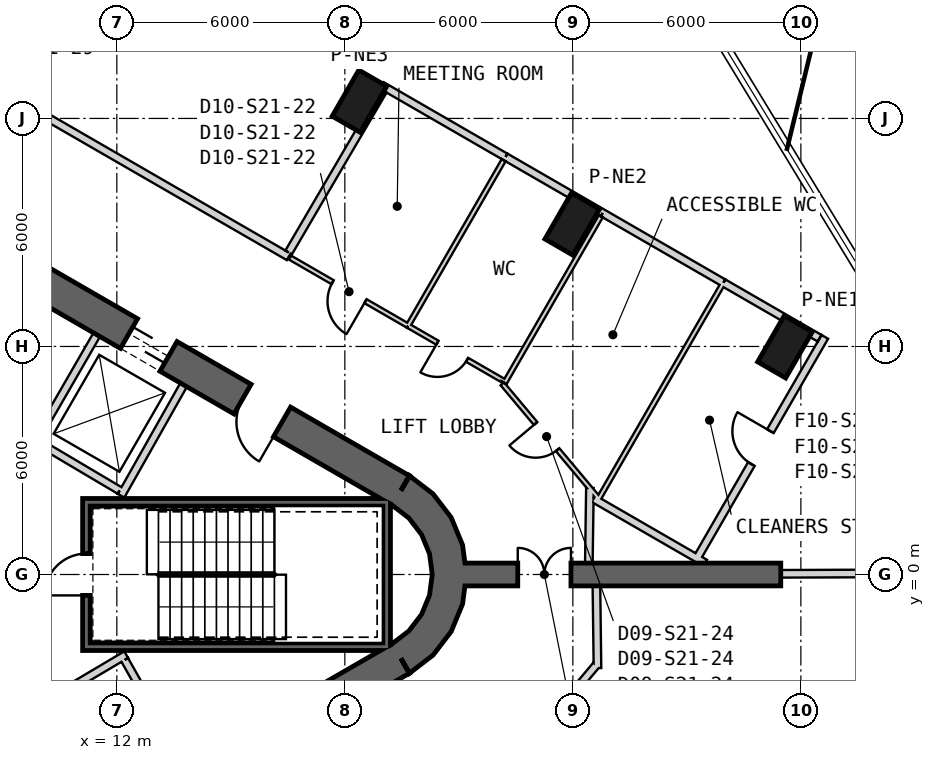
"""IFC4 building model, lengths in metres.
Left out: names, types, materials, properties, quantities, classifications, styles, units other than length and angle.
Written with IfcOpenShell. Run it as: python <this file> out.ifc"""

import sys

from ifc_helpers import new_model, si_unit, direction, frame, frame_2d, origin, origin_2d, place, context, subcontext, project, spatial, polyline, rectangle, outline, extrude, element, fill, save


model = new_model("IFC4")
c1 = context("Model", 3, precision=1e-05, world=origin(), true_north=direction((0.0, 1.0)))
c2 = subcontext(c1, "Body", "Model", "MODEL_VIEW")
j1 = project(units=[si_unit("LENGTHUNIT", "METRE"), si_unit("PLANEANGLEUNIT", "RADIAN")], contexts=[c1])
p1 = place(None, origin())
s1 = spatial("IfcSite", under=j1, at=p1, CompositionType="ELEMENT")
p2 = place(p1, origin())
s2 = spatial("IfcBuilding", under=s1, at=p2, CompositionType="ELEMENT")
p3 = place(p2, frame((0.0, 0.0, 333.8)))
s3 = spatial("IfcBuildingStorey", under=s2, at=p3, CompositionType="ELEMENT", Elevation=333.8)
for number, where, z_axis, x_axis in (
    (1, (29.582, 5.99, 0.0), (0.0, 0.0, 1.0), (0.5, 0.866, 0.0)),
    (2, (23.984, 9.221, 0.0), (0.0, 0.0, 1.0), (0.5, 0.866, 0.0)),
    (3, (18.386, 12.453, 0.0), (0.0, 0.0, 1.0), (0.5, 0.866, 0.0)),
):
    element("IfcColumn", number, at=place(p3, frame(where, z_axis=z_axis, x_axis=x_axis)), inside=s3, PredefinedType="COLUMN", context=c2, shape_type="SweptSolid", body=[
        extrude(rectangle(XDim=1.4, YDim=0.85, at=origin_2d()), origin(), (0.0, 0.0, 1.0), 3.9),
    ])
p4 = place(p3, frame((19.475, 2.208, 0.0), z_axis=(0.0, 0.0, 1.0), x_axis=(-0.866028369851, 0.499994862586, 0.0)))
e4 = element("IfcWall", 4, at=p4, inside=s3, PredefinedType="SHEAR", context=c2, shape_type="SweptSolid", body=[
    extrude(rectangle(XDim=31.523, YDim=0.9, at=frame_2d((15.762, 0.0))), origin(), (0.0, 0.0, 1.0), 3.9),
])
p5 = place(p4, frame((7.062, 0.0, 0.0)))
e5 = element("IfcOpeningElement", 5, at=p5, cuts=e4, PredefinedType="OPENING", context=c2, shape_type="SweptSolid", body=[
    extrude(rectangle(XDim=1.2, YDim=2.4, at=frame_2d((0.6, 1.2))), frame((0.0, 0.46, 0.0), z_axis=(0.0, -1.0, 0.0), x_axis=(1.0, 0.0, 0.0)), (0.0, 0.0, 1.0), 0.92),
])
p6 = place(p4, frame((3.612, 0.0, 0.0)))
e6 = element("IfcOpeningElement", 6, at=p6, cuts=e4, PredefinedType="OPENING", context=c2, shape_type="SweptSolid", body=[
    extrude(rectangle(XDim=1.2, YDim=2.4, at=frame_2d((0.6, 1.2))), frame((0.0, 0.46, 0.0), z_axis=(0.0, -1.0, 0.0), x_axis=(1.0, 0.0, 0.0)), (0.0, 0.0, 1.0), 0.92),
])
p7 = place(p4, frame((26.712, 0.0, 0.0)))
e7 = element("IfcOpeningElement", 7, at=p7, cuts=e4, PredefinedType="OPENING", context=c2, shape_type="SweptSolid", body=[
    extrude(rectangle(XDim=1.2, YDim=2.4, at=frame_2d((0.6, 1.2))), frame((0.0, 0.46, 0.0), z_axis=(0.0, -1.0, 0.0), x_axis=(1.0, 0.0, 0.0)), (0.0, 0.0, 1.0), 0.92),
])
p8 = place(p3, frame((-7.825, -17.97, 0.0), z_axis=(0.0, 0.0, 1.0), x_axis=(0.866028369851, 0.499994862586, 0.0)))
e8 = element("IfcWall", 8, at=p8, inside=s3, PredefinedType="SHEAR", context=c2, shape_type="SweptSolid", body=[
    extrude(rectangle(XDim=31.523, YDim=0.9, at=frame_2d((15.762, 0.0))), origin(), (0.0, 0.0, 1.0), 3.9),
])
p9 = place(p8, frame((17.862, 0.0, 0.0)))
e9 = element("IfcOpeningElement", 9, at=p9, cuts=e8, PredefinedType="OPENING", context=c2, shape_type="SweptSolid", body=[
    extrude(rectangle(XDim=1.2, YDim=2.4, at=frame_2d((0.6, 1.2))), frame((0.0, 0.46, 0.0), z_axis=(0.0, -1.0, 0.0), x_axis=(1.0, 0.0, 0.0)), (0.0, 0.0, 1.0), 0.92),
])
p10 = place(p8, frame((20.562, 0.0, 0.0)))
e10 = element("IfcOpeningElement", 10, at=p10, cuts=e8, PredefinedType="OPENING", context=c2, shape_type="SweptSolid", body=[
    extrude(rectangle(XDim=1.2, YDim=2.4, at=frame_2d((0.6, 1.2))), frame((0.0, 0.46, 0.0), z_axis=(0.0, -1.0, 0.0), x_axis=(1.0, 0.0, 0.0)), (0.0, 0.0, 1.0), 0.92),
])
p11 = place(p8, frame((26.712, 0.0, 0.0)))
e11 = element("IfcOpeningElement", 11, at=p11, cuts=e8, PredefinedType="OPENING", context=c2, shape_type="SweptSolid", body=[
    extrude(rectangle(XDim=1.2, YDim=2.4, at=frame_2d((0.6, 1.2))), frame((0.0, 0.46, 0.0), z_axis=(0.0, -1.0, 0.0), x_axis=(1.0, 0.0, 0.0)), (0.0, 0.0, 1.0), 0.92),
])
p12 = place(p8, frame((3.612, 0.0, 0.0)))
e12 = element("IfcOpeningElement", 12, at=p12, cuts=e8, PredefinedType="OPENING", context=c2, shape_type="SweptSolid", body=[
    extrude(rectangle(XDim=1.2, YDim=2.4, at=frame_2d((0.6, 1.2))), frame((0.0, 0.46, 0.0), z_axis=(0.0, -1.0, 0.0), x_axis=(1.0, 0.0, 0.0)), (0.0, 0.0, 1.0), 0.92),
])
p13 = place(p3, origin())
e13 = element("IfcWall", 13, at=p13, inside=s3, PredefinedType="SHEAR", context=c2, shape_type="SweptSolid", body=[
    extrude(outline(polyline([(19.7, -2.598), (20.321, -2.121), (20.798, -1.5), (21.098, -0.777), (21.2, 0.0), (21.098, 0.777), (20.798, 1.5), (20.321, 2.121), (19.7, 2.598), (19.25, 1.819), (19.685, 1.485), (20.019, 1.05), (20.229, 0.543), (20.3, 0.0), (20.229, -0.543), (20.019, -1.05), (19.685, -1.485), (19.25, -1.819), (19.7, -2.598)])), origin(), (0.0, 0.0, 1.0), 3.9),
])
p14 = place(p3, frame((21.15, 0.0, 0.0), z_axis=(0.0, 0.0, 1.0), x_axis=(1.0, 0.0, 0.0)))
e14 = element("IfcWall", 14, at=p14, inside=s3, PredefinedType="SHEAR", context=c2, shape_type="SweptSolid", body=[
    extrude(rectangle(XDim=8.321, YDim=0.6, at=frame_2d((4.16, 0.0))), origin(), (0.0, 0.0, 1.0), 3.9),
])
p15 = place(p14, frame((1.4, 0.0, 0.0)))
e15 = element("IfcOpeningElement", 15, at=p15, cuts=e14, PredefinedType="OPENING", context=c2, shape_type="SweptSolid", body=[
    extrude(rectangle(XDim=1.4, YDim=2.4, at=frame_2d((0.7, 1.2))), frame((0.0, 0.31, 0.0), z_axis=(0.0, -1.0, 0.0), x_axis=(1.0, 0.0, 0.0)), (0.0, 0.0, 1.0), 0.62),
])
p16 = place(p3, frame((9.847, 3.495, 0.0), z_axis=(0.0, 0.0, 1.0), x_axis=(0.499984717929, 0.866034226713, 0.0)))
e16 = element("IfcWall", 16, at=p16, inside=s3, PredefinedType="PLUMBINGWALL", context=c2, shape_type="SweptSolid", body=[
    extrude(rectangle(XDim=3.25, YDim=0.2, at=frame_2d((1.625, 0.0))), origin(), (0.0, 0.0, 1.0), 3.6),
])
p17 = place(p3, frame((12.11, 2.073, 0.0), z_axis=(0.0, 0.0, 1.0), x_axis=(0.49196600604, 0.870614408852, 0.0)))
e17 = element("IfcWall", 17, at=p17, inside=s3, PredefinedType="PLUMBINGWALL", context=c2, shape_type="SweptSolid", body=[
    extrude(rectangle(XDim=3.35, YDim=0.2, at=frame_2d((1.675, 0.0))), origin(), (0.0, 0.0, 1.0), 3.6),
])
p18 = place(p3, frame((12.073, 2.211, 0.0), z_axis=(0.0, 0.0, 1.0), x_axis=(-0.860414880418, 0.509594185166, 0.0)))
e18 = element("IfcWall", 18, at=p18, inside=s3, PredefinedType="PLUMBINGWALL", context=c2, shape_type="SweptSolid", body=[
    extrude(rectangle(XDim=2.7, YDim=0.2, at=frame_2d((1.35, 0.0))), origin(), (0.0, 0.0, 1.0), 3.6),
])
p19 = place(p3, frame((19.2, 1.9, -0.3), z_axis=(0.0, 0.0, 1.0), x_axis=(-1.0, 0.0, 0.0)))
e19 = element("IfcWall", 19, at=p19, inside=s3, PredefinedType="SHEAR", context=c2, shape_type="SweptSolid", body=[
    extrude(rectangle(XDim=8.1, YDim=0.2, at=frame_2d((4.05, 0.0))), origin(), (0.0, 0.0, 1.0), 3.9),
])
p20 = place(p3, frame((19.1, -2.0, -0.3), z_axis=(0.0, 0.0, 1.0), x_axis=(0.0, 1.0, 0.0)))
e20 = element("IfcWall", 20, at=p20, inside=s3, PredefinedType="SHEAR", context=c2, shape_type="SweptSolid", body=[
    extrude(rectangle(XDim=3.8, YDim=0.2, at=frame_2d((1.9, 0.0))), origin(), (0.0, 0.0, 1.0), 3.9),
])
p21 = place(p3, frame((11.1, -1.9, -0.3), z_axis=(0.0, 0.0, 1.0), x_axis=(1.0, 0.0, 0.0)))
e21 = element("IfcWall", 21, at=p21, inside=s3, PredefinedType="SHEAR", context=c2, shape_type="SweptSolid", body=[
    extrude(rectangle(XDim=7.9, YDim=0.2, at=frame_2d((3.95, 0.0))), origin(), (0.0, 0.0, 1.0), 3.9),
])
p22 = place(p3, frame((11.2, -1.8, -0.3), z_axis=(0.0, 0.0, 1.0), x_axis=(0.0, 1.0, 0.0)))
e22 = element("IfcWall", 22, at=p22, inside=s3, PredefinedType="SHEAR", context=c2, shape_type="SweptSolid", body=[
    extrude(rectangle(XDim=3.6, YDim=0.2, at=frame_2d((1.8, 0.0))), origin(), (0.0, 0.0, 1.0), 3.9),
])
p23 = place(p22, frame((1.25, 0.0, 0.3)))
e23 = element("IfcOpeningElement", 23, at=p23, cuts=e22, PredefinedType="OPENING", context=c2, shape_type="SweptSolid", body=[
    extrude(rectangle(XDim=1.1, YDim=2.1, at=frame_2d((0.55, 1.05))), frame((0.0, 0.11, 0.0), z_axis=(0.0, -1.0, 0.0), x_axis=(1.0, 0.0, 0.0)), (0.0, 0.0, 1.0), 0.22),
])
p24 = place(p3, frame((12.245, -2.109, 0.0), z_axis=(0.0, 0.0, 1.0), x_axis=(-0.860414880418, -0.509594185166, 0.0)))
e24 = element("IfcWall", 24, at=p24, inside=s3, PredefinedType="PARTITIONING", context=c2, shape_type="SweptSolid", body=[
    extrude(rectangle(XDim=2.7, YDim=0.2, at=frame_2d((1.35, 0.0))), origin(), (0.0, 0.0, 1.0), 3.6),
])
p25 = place(p3, frame((13.758, -4.99, 0.0), z_axis=(0.0, 0.0, 1.0), x_axis=(-0.491993409184, 0.87059892334, 0.0)))
e25 = element("IfcWall", 25, at=p25, inside=s3, PredefinedType="PARTITIONING", context=c2, shape_type="SweptSolid", body=[
    extrude(rectangle(XDim=3.15, YDim=0.2, at=frame_2d((1.575, 0.0))), origin(), (0.0, 0.0, 1.0), 3.6),
])
p26 = place(p25, frame((1.175, 0.0, 0.0)))
e26 = element("IfcOpeningElement", 26, at=p26, cuts=e25, PredefinedType="OPENING", context=c2, shape_type="SweptSolid", body=[
    extrude(rectangle(XDim=0.8, YDim=2.1, at=frame_2d((0.4, 1.05))), frame((0.0, 0.11, 0.0), z_axis=(0.0, -1.0, 0.0), x_axis=(1.0, 0.0, 0.0)), (0.0, 0.0, 1.0), 0.22),
])
p27 = place(p3, frame((16.523, 8.358, 0.0), z_axis=(0.0, 0.0, 1.0), x_axis=(-0.866025545866, 0.499999753908, 0.0)))
e27 = element("IfcWall", 27, at=p27, inside=s3, PredefinedType="PARTITIONING", context=c2, shape_type="SweptSolid", body=[
    extrude(rectangle(XDim=26.471, YDim=0.2, at=frame_2d((13.235, 0.0))), origin(), (0.0, 0.0, 1.0), 2.97),
])
p28 = place(p27, frame((21.568, 0.0, 0.0)))
e28 = element("IfcOpeningElement", 28, at=p28, cuts=e27, PredefinedType="OPENING", context=c2, shape_type="SweptSolid", body=[
    extrude(rectangle(XDim=1.0, YDim=2.1, at=frame_2d((0.5, 1.05))), frame((0.0, 0.11, 0.0), z_axis=(0.0, -1.0, 0.0), x_axis=(1.0, 0.0, 0.0)), (0.0, 0.0, 1.0), 0.22),
])
p29 = place(p27, frame((8.333, 0.0, 0.0)))
e29 = element("IfcOpeningElement", 29, at=p29, cuts=e27, PredefinedType="OPENING", context=c2, shape_type="SweptSolid", body=[
    extrude(rectangle(XDim=1.0, YDim=2.1, at=frame_2d((0.5, 1.05))), frame((0.0, 0.11, 0.0), z_axis=(0.0, -1.0, 0.0), x_axis=(1.0, 0.0, 0.0)), (0.0, 0.0, 1.0), 0.22),
])
p30 = place(p3, frame((24.421, 0.3, 0.0), z_axis=(0.0, 0.0, 1.0), x_axis=(0.014331902383, 0.999897293013, 0.0)))
e30 = element("IfcWall", 30, at=p30, inside=s3, PredefinedType="PARTITIONING", context=c2, shape_type="SweptSolid", body=[
    extrude(rectangle(XDim=1.976, YDim=0.2, at=frame_2d((0.988, 0.0))), origin(), (0.0, 0.0, 1.0), 3.6),
])
p31 = place(p3, frame((22.168, 5.099, 0.0), z_axis=(0.0, 0.0, 1.0), x_axis=(-0.866005628554, 0.500034250139, 0.0)))
e31 = element("IfcWall", 31, at=p31, inside=s3, PredefinedType="PARTITIONING", context=c2, shape_type="SweptSolid", body=[
    extrude(rectangle(XDim=2.892, YDim=0.12, at=frame_2d((1.446, 0.0))), origin(), (0.0, 0.0, 1.0), 3.6),
])
p32 = place(p31, frame((1.1, 0.0, 0.0)))
e32 = element("IfcOpeningElement", 32, at=p32, cuts=e31, PredefinedType="OPENING", context=c2, shape_type="SweptSolid", body=[
    extrude(rectangle(XDim=0.9, YDim=2.1, at=frame_2d((0.45, 1.05))), frame((0.0, 0.07, 0.0), z_axis=(0.0, -1.0, 0.0), x_axis=(1.0, 0.0, 0.0)), (0.0, 0.0, 1.0), 0.14),
])
p33 = place(p3, frame((19.664, 6.545, 0.0), z_axis=(0.0, 0.0, 1.0), x_axis=(-0.866048453834, 0.499960074017, 0.0)))
e33 = element("IfcWall", 33, at=p33, inside=s3, PredefinedType="PARTITIONING", context=c2, shape_type="SweptSolid", body=[
    extrude(rectangle(XDim=3.587, YDim=0.12, at=frame_2d((1.793, 0.0))), origin(), (0.0, 0.0, 1.0), 2.97),
])
p34 = place(p33, frame((1.294, 0.0, 0.0)))
e34 = element("IfcOpeningElement", 34, at=p34, cuts=e33, PredefinedType="OPENING", context=c2, shape_type="SweptSolid", body=[
    extrude(rectangle(XDim=1.0, YDim=2.1, at=frame_2d((0.5, 1.05))), frame((0.0, 0.07, 0.0), z_axis=(0.0, -1.0, 0.0), x_axis=(1.0, 0.0, 0.0)), (0.0, 0.0, 1.0), 0.14),
])
p35 = place(p3, frame((24.64, 2.043, 0.0), z_axis=(0.0, 0.0, 1.0), x_axis=(-0.642784930138, 0.766046691519, 0.0)))
e35 = element("IfcWall", 35, at=p35, inside=s3, PredefinedType="PARTITIONING", context=c2, shape_type="SweptSolid", body=[
    extrude(rectangle(XDim=3.882, YDim=0.12, at=frame_2d((1.941, 0.0))), origin(), (0.0, 0.0, 1.0), 2.88),
])
p36 = place(p35, frame((1.621, 0.0, 0.0)))
e36 = element("IfcOpeningElement", 36, at=p36, cuts=e35, PredefinedType="OPENING", context=c2, shape_type="SweptSolid", body=[
    extrude(rectangle(XDim=0.9, YDim=2.1, at=frame_2d((0.45, 1.05))), frame((0.0, 0.07, 0.0), z_axis=(0.0, -1.0, 0.0), x_axis=(1.0, 0.0, 0.0)), (0.0, 0.0, 1.0), 0.14),
])
p37 = place(p3, frame((24.648, -2.462, 0.0), z_axis=(0.0, 0.0, 1.0), x_axis=(-0.012757232068, 0.999918623204, 0.0)))
e37 = element("IfcWall", 37, at=p37, inside=s3, PredefinedType="PARTITIONING", context=c2, shape_type="SweptSolid", body=[
    extrude(rectangle(XDim=2.163, YDim=0.2, at=frame_2d((1.081, 0.0))), origin(), (0.0, 0.0, 1.0), 3.6),
])
p38 = place(p3, frame((22.054, -5.435, 0.0), z_axis=(0.0, 0.0, 1.0), x_axis=(0.642790979996, 0.766041615081, 0.0)))
e38 = element("IfcWall", 38, at=p38, inside=s3, PredefinedType="PARTITIONING", context=c2, shape_type="SweptSolid", body=[
    extrude(rectangle(XDim=3.983, YDim=0.2, at=frame_2d((1.992, 0.0))), origin(), (0.0, 0.0, 1.0), 2.88),
])
p39 = place(p3, frame((29.471, 0.018, 0.0), z_axis=(0.0, 0.0, 1.0), x_axis=(0.999993083977, 0.003719139364, 0.0)))
e39 = element("IfcWall", 39, at=p39, inside=s3, PredefinedType="PARTITIONING", context=c2, shape_type="SweptSolid", body=[
    extrude(rectangle(XDim=3.217, YDim=0.2, at=frame_2d((1.608, 0.0))), origin(), (0.0, 0.0, 1.0), 3.17),
])
p40 = place(p3, frame((18.975, 12.866, 0.0), z_axis=(0.0, 0.0, 1.0), x_axis=(0.866007030292, -0.500031822473, 0.0)))
e40 = element("IfcWall", 40, at=p40, inside=s3, PredefinedType="PARTITIONING", context=c2, shape_type="SweptSolid", body=[
    extrude(rectangle(XDim=3.757, YDim=0.2, at=frame_2d((1.878, 0.0))), origin(), (0.0, 0.0, 1.0), 3.6),
])
p41 = place(p3, frame((22.229, 10.988, 0.0), z_axis=(0.0, 0.0, 1.0), x_axis=(0.86604097052, -0.499973036653, 0.0)))
e41 = element("IfcWall", 41, at=p41, inside=s3, PredefinedType="PARTITIONING", context=c2, shape_type="SweptSolid", body=[
    extrude(rectangle(XDim=2.952, YDim=0.2, at=frame_2d((1.476, 0.0))), origin(), (0.0, 0.0, 1.0), 3.6),
])
p42 = place(p3, frame((24.785, 9.512, 0.0), z_axis=(0.0, 0.0, 1.0), x_axis=(0.866027105532, -0.499997052475, 0.0)))
e42 = element("IfcWall", 42, at=p42, inside=s3, PredefinedType="PARTITIONING", context=c2, shape_type="SweptSolid", body=[
    extrude(rectangle(XDim=3.668, YDim=0.2, at=frame_2d((1.834, 0.0))), origin(), (0.0, 0.0, 1.0), 3.6),
])
p43 = place(p3, frame((27.962, 7.677, 0.0), z_axis=(0.0, 0.0, 1.0), x_axis=(0.866003347003, -0.50003820152, 0.0)))
e43 = element("IfcWall", 43, at=p43, inside=s3, PredefinedType="PARTITIONING", context=c2, shape_type="SweptSolid", body=[
    extrude(rectangle(XDim=2.923, YDim=0.2, at=frame_2d((1.461, 0.0))), origin(), (0.0, 0.0, 1.0), 3.6),
])
p44 = place(p3, frame((16.521, 8.475, 0.0), z_axis=(0.0, 0.0, 1.0), x_axis=(0.505019065689, 0.863108187477, 0.0)))
e44 = element("IfcWall", 44, at=p44, inside=s3, PredefinedType="PARTITIONING", context=c2, shape_type="SweptSolid", body=[
    extrude(rectangle(XDim=4.93, YDim=0.2, at=frame_2d((2.465, 0.0))), origin(), (0.0, 0.0, 1.0), 3.6),
])
p45 = place(p3, frame((24.545, 1.995, 0.0), z_axis=(0.0, 0.0, 1.0), x_axis=(0.866027263711, -0.4999967785, 0.0)))
e45 = element("IfcWall", 45, at=p45, inside=s3, PredefinedType="PARTITIONING", context=c2, shape_type="SweptSolid", body=[
    extrude(rectangle(XDim=3.39, YDim=0.2, at=frame_2d((1.695, 0.0))), origin(), (0.0, 0.0, 1.0), 3.6),
])
p46 = place(p3, frame((27.315, 0.511, 0.0), z_axis=(0.0, 0.0, 1.0), x_axis=(0.499996585558, 0.866027375104, 0.0)))
e46 = element("IfcWall", 46, at=p46, inside=s3, PredefinedType="PARTITIONING", context=c2, shape_type="SweptSolid", body=[
    extrude(rectangle(XDim=6.63, YDim=0.2, at=frame_2d((3.315, 0.0))), origin(), (0.0, 0.0, 1.0), 3.6),
])
p47 = place(p46, frame((2.765, 0.0, 0.0)))
e47 = element("IfcOpeningElement", 47, at=p47, cuts=e46, PredefinedType="OPENING", context=c2, shape_type="SweptSolid", body=[
    extrude(rectangle(XDim=1.0, YDim=2.1, at=frame_2d((0.5, 1.05))), frame((0.0, 0.11, 0.0), z_axis=(0.0, -1.0, 0.0), x_axis=(1.0, 0.0, 0.0)), (0.0, 0.0, 1.0), 0.22),
])
p48 = place(p3, frame((19.694, 6.597, 0.0), z_axis=(0.0, 0.0, 1.0), x_axis=(0.499974753747, 0.866039979225, 0.0)))
e48 = element("IfcWall", 48, at=p48, inside=s3, PredefinedType="PARTITIONING", context=c2, shape_type="SweptSolid", body=[
    extrude(rectangle(XDim=4.97, YDim=0.12, at=frame_2d((2.485, 0.0))), origin(), (0.0, 0.0, 1.0), 2.97),
])
p49 = place(p3, frame((24.735, 9.425, 0.0), z_axis=(0.0, 0.0, 1.0), x_axis=(-0.500002065185, -0.866024211446, 0.0)))
e49 = element("IfcWall", 49, at=p49, inside=s3, PredefinedType="PARTITIONING", context=c2, shape_type="SweptSolid", body=[
    extrude(rectangle(XDim=5.064, YDim=0.12, at=frame_2d((2.532, 0.0))), origin(), (0.0, 0.0, 1.0), 3.6),
])
p50 = place(p3, frame((24.697, 2.022, 0.0), z_axis=(0.0, 0.0, 1.0), x_axis=(0.500006199568, 0.866021824432, 0.0)))
e50 = element("IfcWall", 50, at=p50, inside=s3, PredefinedType="PARTITIONING", context=c2, shape_type="SweptSolid", body=[
    extrude(rectangle(XDim=6.43, YDim=0.12, at=frame_2d((3.215, 0.0))), origin(), (0.0, 0.0, 1.0), 2.88),
])
p51 = place(p23, origin())
e51 = element("IfcDoor", 51, at=p51, inside=s3, OperationType="SINGLE_SWING_RIGHT", PredefinedType="USERDEFINED", context=c2, shape_type="SweptSolid", body=[
    extrude(rectangle(XDim=1.1, YDim=2.1, at=frame_2d((0.55, 1.05))), frame((0.0, 0.025, 0.0), z_axis=(0.0, -1.0, 0.0), x_axis=(1.0, 0.0, 0.0)), (0.0, 0.0, 1.0), 0.05),
])
fill(e23, e51)
p52 = place(p34, origin())
e52 = element("IfcDoor", 52, at=p52, inside=s3, OperationType="SINGLE_SWING_RIGHT", PredefinedType="NOTDEFINED", context=c2, shape_type="SweptSolid", body=[
    extrude(rectangle(XDim=1.0, YDim=2.1, at=frame_2d((0.5, 1.05))), frame((0.0, 0.025, 0.0), z_axis=(0.0, -1.0, 0.0), x_axis=(1.0, 0.0, 0.0)), (0.0, 0.0, 1.0), 0.05),
])
fill(e34, e52)
p53 = place(p32, origin())
e53 = element("IfcDoor", 53, at=p53, inside=s3, OperationType="SINGLE_SWING_RIGHT", PredefinedType="NOTDEFINED", context=c2, shape_type="SweptSolid", body=[
    extrude(rectangle(XDim=0.9, YDim=2.1, at=frame_2d((0.45, 1.05))), frame((0.0, 0.025, 0.0), z_axis=(0.0, -1.0, 0.0), x_axis=(1.0, 0.0, 0.0)), (0.0, 0.0, 1.0), 0.05),
])
fill(e32, e53)
p54 = place(p36, origin())
e54 = element("IfcDoor", 54, at=p54, inside=s3, OperationType="SINGLE_SWING_LEFT", PredefinedType="NOTDEFINED", context=c2, shape_type="SweptSolid", body=[
    extrude(rectangle(XDim=0.9, YDim=2.1, at=frame_2d((0.45, 1.05))), frame((0.0, 0.025, 0.0), z_axis=(0.0, -1.0, 0.0), x_axis=(1.0, 0.0, 0.0)), (0.0, 0.0, 1.0), 0.05),
])
fill(e36, e54)
p55 = place(p47, origin())
e55 = element("IfcDoor", 55, at=p55, inside=s3, OperationType="SINGLE_SWING_RIGHT", PredefinedType="USERDEFINED", context=c2, shape_type="SweptSolid", body=[
    extrude(rectangle(XDim=1.0, YDim=2.1, at=frame_2d((0.5, 1.05))), frame((0.0, 0.025, 0.0), z_axis=(0.0, -1.0, 0.0), x_axis=(1.0, 0.0, 0.0)), (0.0, 0.0, 1.0), 0.05),
])
fill(e47, e55)
p56 = place(p5, origin())
e56 = element("IfcDoor", 56, at=p56, inside=s3, OperationType="SLIDING_TO_LEFT", PredefinedType="USERDEFINED", context=c2, shape_type="SweptSolid", body=[
    extrude(rectangle(XDim=1.2, YDim=2.4, at=frame_2d((0.6, 1.2))), frame((0.0, 0.025, 0.0), z_axis=(0.0, -1.0, 0.0), x_axis=(1.0, 0.0, 0.0)), (0.0, 0.0, 1.0), 0.05),
])
fill(e5, e56)
p57 = place(p6, origin())
e57 = element("IfcDoor", 57, at=p57, inside=s3, OperationType="SINGLE_SWING_LEFT", PredefinedType="USERDEFINED", context=c2, shape_type="SweptSolid", body=[
    extrude(rectangle(XDim=1.2, YDim=2.4, at=frame_2d((0.6, 1.2))), frame((0.0, 0.025, 0.0), z_axis=(0.0, -1.0, 0.0), x_axis=(1.0, 0.0, 0.0)), (0.0, 0.0, 1.0), 0.05),
])
fill(e6, e57)
p58 = place(p15, origin())
e58 = element("IfcDoor", 58, at=p58, inside=s3, OperationType="DOUBLE_DOOR_SINGLE_SWING", PredefinedType="NOTDEFINED", context=c2, shape_type="SweptSolid", body=[
    extrude(rectangle(XDim=1.4, YDim=2.4, at=frame_2d((0.7, 1.2))), frame((0.0, 0.025, 0.0), z_axis=(0.0, -1.0, 0.0), x_axis=(1.0, 0.0, 0.0)), (0.0, 0.0, 1.0), 0.05),
])
fill(e15, e58)
save(model, sys.argv[1])
